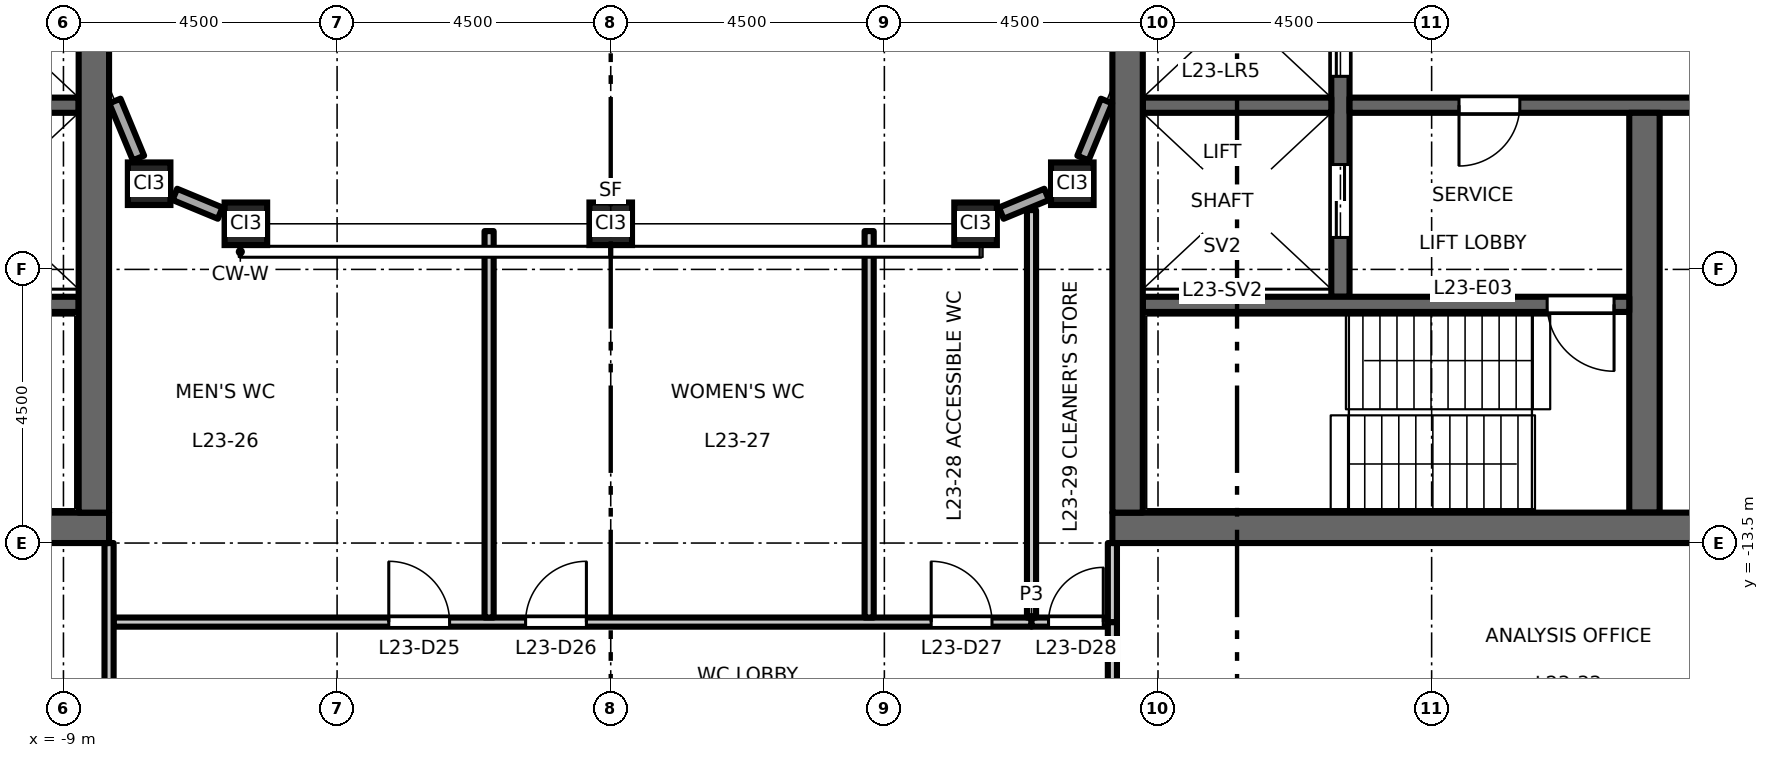
"""IFC4 building model, lengths in metres.
Left out: names, types, materials, properties, quantities, classifications, styles, units other than length and angle.
Written with IfcOpenShell. Run it as: python <this file> out.ifc"""

import sys

from ifc_helpers import new_model, si_unit, direction, frame, frame_2d, origin, origin_2d, place, context, subcontext, project, spatial, rectangle, hollow_rectangle, extrude, element, fill, save


model = new_model("IFC4")
c1 = context("Model", 3, precision=1e-05, world=origin(), true_north=direction((0.0, 1.0)))
c2 = subcontext(c1, "Body", "Model", "MODEL_VIEW")
j1 = project(units=[si_unit("LENGTHUNIT", "METRE"), si_unit("PLANEANGLEUNIT", "RADIAN")], contexts=[c1])
p1 = place(None, origin())
s1 = spatial("IfcSite", under=j1, at=p1, CompositionType="ELEMENT")
p2 = place(p1, origin())
s2 = spatial("IfcBuilding", under=s1, at=p2, CompositionType="ELEMENT")
p3 = place(p2, frame((0.0, 0.0, 109.2)))
s3 = spatial("IfcBuildingStorey", under=s2, at=p3, CompositionType="ELEMENT", Elevation=109.2)
for number, where, z_axis, x_axis in (
    (1, (-7.591, -7.591, 0.0), (0.0, 0.0, 1.0), (1.0, 0.0, 0.0)),
    (2, (-6.0, -8.25, 0.0), (0.0, 0.0, 1.0), (1.0, 0.0, 0.0)),
    (3, (0.0, -8.25, 0.0), (0.0, 0.0, 1.0), (1.0, 0.0, 0.0)),
    (4, (6.0, -8.25, 0.0), (0.0, 0.0, 1.0), (1.0, 0.0, 0.0)),
    (5, (7.591, -7.591, 0.0), (0.0, 0.0, 1.0), (1.0, 0.0, 0.0)),
):
    element("IfcColumn", number, at=place(p3, frame(where, z_axis=z_axis, x_axis=x_axis)), inside=s3, PredefinedType="COLUMN", context=c2, shape_type="SweptSolid", body=[
        extrude(hollow_rectangle(XDim=0.7, YDim=0.7, WallThickness=0.04, at=origin_2d()), origin(), (0.0, 0.0, 1.0), 4.5),
    ])
p4 = place(p3, frame((-8.75, -6.3, 0.0), z_axis=(0.0, 0.0, 1.0), x_axis=(-1.0, 0.0, 0.0)))
e6 = element("IfcWall", 6, at=p4, inside=s3, PredefinedType="SHEAR", context=c2, shape_type="SweptSolid", body=[
    extrude(rectangle(XDim=3.1, YDim=0.25, at=frame_2d((1.55, 0.0))), origin(), (0.0, 0.0, 1.0), 4.35),
])
p5 = place(p3, frame((-8.75, -9.575, 0.0), z_axis=(0.0, 0.0, 1.0), x_axis=(-1.0, 0.0, 0.0)))
e7 = element("IfcWall", 7, at=p5, inside=s3, PredefinedType="SHEAR", context=c2, shape_type="SweptSolid", body=[
    extrude(rectangle(XDim=8.0, YDim=0.25, at=frame_2d((4.0, 0.0))), origin(), (0.0, 0.0, 1.0), 4.35),
])
p6 = place(p5, frame((6.65, 0.0, 0.0)))
e8 = element("IfcOpeningElement", 8, at=p6, cuts=e7, PredefinedType="OPENING", context=c2, shape_type="SweptSolid", body=[
    extrude(rectangle(XDim=1.1, YDim=2.1, at=frame_2d((0.55, 1.05))), frame((0.0, 0.135, 0.0), z_axis=(0.0, -1.0, 0.0), x_axis=(1.0, 0.0, 0.0)), (0.0, 0.0, 1.0), 0.27),
])
p7 = place(p3, frame((-8.25, -13.25, 0.0), z_axis=(0.0, 0.0, 1.0), x_axis=(-1.0, 0.0, 0.0)))
e9 = element("IfcWall", 9, at=p7, inside=s3, PredefinedType="SHEAR", context=c2, shape_type="SweptSolid", body=[
    extrude(rectangle(XDim=13.5, YDim=0.5, at=frame_2d((6.75, 0.0))), origin(), (0.0, 0.0, 1.0), 4.35),
])
p8 = place(p3, frame((-8.5, -13.0, 0.0), z_axis=(0.0, 0.0, 1.0), x_axis=(0.0, 1.0, 0.0)))
e10 = element("IfcWall", 10, at=p8, inside=s3, PredefinedType="SHEAR", context=c2, shape_type="SweptSolid", body=[
    extrude(rectangle(XDim=26.0, YDim=0.5, at=frame_2d((13.0, 0.0))), origin(), (0.0, 0.0, 1.0), 4.35),
])
p9 = place(p3, frame((12.0, -9.45, 0.0), z_axis=(0.0, 0.0, 1.0), x_axis=(0.0, 1.0, 0.0)))
e11 = element("IfcWall", 11, at=p9, inside=s3, PredefinedType="SHEAR", context=c2, shape_type="SweptSolid", body=[
    extrude(rectangle(XDim=18.9, YDim=0.3, at=frame_2d((9.45, 0.0))), origin(), (0.0, 0.0, 1.0), 4.35),
])
p10 = place(p9, frame((3.625, 0.0, 0.0)))
e12 = element("IfcOpeningElement", 12, at=p10, cuts=e11, PredefinedType="OPENING", context=c2, shape_type="SweptSolid", body=[
    extrude(rectangle(XDim=1.1, YDim=2.1, at=frame_2d((0.55, 1.05))), frame((0.0, 0.16, 0.0), z_axis=(0.0, -1.0, 0.0), x_axis=(1.0, 0.0, 0.0)), (0.0, 0.0, 1.0), 0.32),
])
p11 = place(p9, frame((6.775, 0.0, 0.0)))
e13 = element("IfcOpeningElement", 13, at=p11, cuts=e11, PredefinedType="OPENING", context=c2, shape_type="SweptSolid", body=[
    extrude(rectangle(XDim=1.1, YDim=2.1, at=frame_2d((0.55, 1.05))), frame((0.0, 0.16, 0.0), z_axis=(0.0, -1.0, 0.0), x_axis=(1.0, 0.0, 0.0)), (0.0, 0.0, 1.0), 0.32),
])
p12 = place(p9, frame((9.925, 0.0, 0.0)))
e14 = element("IfcOpeningElement", 14, at=p12, cuts=e11, PredefinedType="OPENING", context=c2, shape_type="SweptSolid", body=[
    extrude(rectangle(XDim=1.1, YDim=2.1, at=frame_2d((0.55, 1.05))), frame((0.0, 0.16, 0.0), z_axis=(0.0, -1.0, 0.0), x_axis=(1.0, 0.0, 0.0)), (0.0, 0.0, 1.0), 0.32),
])
p13 = place(p9, frame((13.075, 0.0, 0.0)))
e15 = element("IfcOpeningElement", 15, at=p13, cuts=e11, PredefinedType="OPENING", context=c2, shape_type="SweptSolid", body=[
    extrude(rectangle(XDim=1.1, YDim=2.1, at=frame_2d((0.55, 1.05))), frame((0.0, 0.16, 0.0), z_axis=(0.0, -1.0, 0.0), x_axis=(1.0, 0.0, 0.0)), (0.0, 0.0, 1.0), 0.32),
])
p14 = place(p9, frame((16.725, 0.0, 0.0)))
e16 = element("IfcOpeningElement", 16, at=p14, cuts=e11, PredefinedType="OPENING", context=c2, shape_type="SweptSolid", body=[
    extrude(rectangle(XDim=1.2, YDim=2.1, at=frame_2d((0.6, 1.05))), frame((0.0, 0.16, 0.0), z_axis=(0.0, -1.0, 0.0), x_axis=(1.0, 0.0, 0.0)), (0.0, 0.0, 1.0), 0.32),
])
p15 = place(p9, frame((0.975, 0.0, 0.0)))
e17 = element("IfcOpeningElement", 17, at=p15, cuts=e11, PredefinedType="OPENING", context=c2, shape_type="SweptSolid", body=[
    extrude(rectangle(XDim=1.2, YDim=2.1, at=frame_2d((0.6, 1.05))), frame((0.0, 0.16, 0.0), z_axis=(0.0, -1.0, 0.0), x_axis=(1.0, 0.0, 0.0)), (0.0, 0.0, 1.0), 0.32),
])
p16 = place(p3, frame((12.15, -6.3, 0.0), z_axis=(0.0, 0.0, 1.0), x_axis=(1.0, 0.0, 0.0)))
e18 = element("IfcWall", 18, at=p16, inside=s3, PredefinedType="SHEAR", context=c2, shape_type="SweptSolid", body=[
    extrude(rectangle(XDim=9.1, YDim=0.25, at=frame_2d((4.55, 0.0))), origin(), (0.0, 0.0, 1.0), 4.35),
])
p17 = place(p16, frame((1.8, 0.0, 0.0)))
e19 = element("IfcOpeningElement", 19, at=p17, cuts=e18, PredefinedType="OPENING", context=c2, shape_type="SweptSolid", body=[
    extrude(rectangle(XDim=1.0, YDim=2.1, at=frame_2d((0.5, 1.05))), frame((0.0, 0.135, 0.0), z_axis=(0.0, -1.0, 0.0), x_axis=(1.0, 0.0, 0.0)), (0.0, 0.0, 1.0), 0.27),
])
p18 = place(p16, frame((6.65, 0.0, 0.0)))
e20 = element("IfcOpeningElement", 20, at=p18, cuts=e18, PredefinedType="OPENING", context=c2, shape_type="SweptSolid", body=[
    extrude(rectangle(XDim=0.9, YDim=2.1, at=frame_2d((0.45, 1.05))), frame((0.0, 0.135, 0.0), z_axis=(0.0, -1.0, 0.0), x_axis=(1.0, 0.0, 0.0)), (0.0, 0.0, 1.0), 0.27),
])
p19 = place(p3, frame((17.0, -13.0, 0.0), z_axis=(0.0, 0.0, 1.0), x_axis=(0.0, 1.0, 0.0)))
e21 = element("IfcWall", 21, at=p19, inside=s3, PredefinedType="SHEAR", context=c2, shape_type="SweptSolid", body=[
    extrude(rectangle(XDim=6.575, YDim=0.5, at=frame_2d((3.288, 0.0))), origin(), (0.0, 0.0, 1.0), 4.35),
])
p20 = place(p3, frame((8.75, -6.3, 0.0), z_axis=(0.0, 0.0, 1.0), x_axis=(1.0, 0.0, 0.0)))
e22 = element("IfcWall", 22, at=p20, inside=s3, PredefinedType="SHEAR", context=c2, shape_type="SweptSolid", body=[
    extrude(rectangle(XDim=3.1, YDim=0.25, at=frame_2d((1.55, 0.0))), origin(), (0.0, 0.0, 1.0), 4.35),
])
p21 = place(p3, frame((8.75, -9.575, 0.0), z_axis=(0.0, 0.0, 1.0), x_axis=(1.0, 0.0, 0.0)))
e23 = element("IfcWall", 23, at=p21, inside=s3, PredefinedType="SHEAR", context=c2, shape_type="SweptSolid", body=[
    extrude(rectangle(XDim=8.0, YDim=0.25, at=frame_2d((4.0, 0.0))), origin(), (0.0, 0.0, 1.0), 4.35),
])
p22 = place(p21, frame((6.65, 0.0, 0.0)))
e24 = element("IfcOpeningElement", 24, at=p22, cuts=e23, PredefinedType="OPENING", context=c2, shape_type="SweptSolid", body=[
    extrude(rectangle(XDim=1.1, YDim=2.1, at=frame_2d((0.55, 1.05))), frame((0.0, 0.135, 0.0), z_axis=(0.0, -1.0, 0.0), x_axis=(1.0, 0.0, 0.0)), (0.0, 0.0, 1.0), 0.27),
])
p23 = place(p3, frame((8.25, -13.25, 0.0), z_axis=(0.0, 0.0, 1.0), x_axis=(1.0, 0.0, 0.0)))
e25 = element("IfcWall", 25, at=p23, inside=s3, PredefinedType="SHEAR", context=c2, shape_type="SweptSolid", body=[
    extrude(rectangle(XDim=13.5, YDim=0.5, at=frame_2d((6.75, 0.0))), origin(), (0.0, 0.0, 1.0), 4.35),
])
p24 = place(p3, frame((8.5, -13.0, 0.0), z_axis=(0.0, 0.0, 1.0), x_axis=(0.0, 1.0, 0.0)))
e26 = element("IfcWall", 26, at=p24, inside=s3, PredefinedType="SHEAR", context=c2, shape_type="SweptSolid", body=[
    extrude(rectangle(XDim=26.0, YDim=0.5, at=frame_2d((13.0, 0.0))), origin(), (0.0, 0.0, 1.0), 4.35),
])
p25 = place(p3, frame((6.423, -8.075, 0.0), z_axis=(0.0, 0.0, 1.0), x_axis=(0.923817771127, 0.382832503518, 0.0)))
e27 = element("IfcWall", 27, at=p25, inside=s3, PredefinedType="STANDARD", context=c2, shape_type="SweptSolid", body=[
    extrude(rectangle(XDim=0.807, YDim=0.2, at=frame_2d((0.404, 0.0))), origin(), (0.0, 0.0, 1.0), 3.826),
])
for number, where, z_axis, x_axis in (
    (28, (7.766, -7.168, 0.0), (0.0, 0.0, 1.0), (0.383, 0.924, 0.0)),
    (29, (-8.154, -6.231, 0.0), (0.0, 0.0, 1.0), (0.383, -0.924, 0.0)),
):
    element("IfcWall", number, at=place(p3, frame(where, z_axis=z_axis, x_axis=x_axis)), inside=s3, PredefinedType="STANDARD", context=c2, shape_type="SweptSolid", body=[
        extrude(rectangle(XDim=1.015, YDim=0.2, at=frame_2d((0.507, 0.0))), origin(), (0.0, 0.0, 1.0), 3.826),
    ])
p26 = place(p3, frame((-7.168, -7.766, 0.0), z_axis=(0.0, 0.0, 1.0), x_axis=(0.923817771127, -0.382832503518, 0.0)))
e30 = element("IfcWall", 30, at=p26, inside=s3, PredefinedType="STANDARD", context=c2, shape_type="SweptSolid", body=[
    extrude(rectangle(XDim=0.807, YDim=0.2, at=frame_2d((0.404, 0.0))), origin(), (0.0, 0.0, 1.0), 3.826),
])
p27 = place(p3, frame((-8.175, -14.8, 0.0), z_axis=(0.0, 0.0, 1.0), x_axis=(1.0, 0.0, 0.0)))
e31 = element("IfcWall", 31, at=p27, inside=s3, PredefinedType="PARTITIONING", context=c2, shape_type="SweptSolid", body=[
    extrude(rectangle(XDim=15.095, YDim=0.15, at=frame_2d((7.547, 0.0))), origin(), (0.0, 0.0, 1.0), 4.35),
])
p28 = place(p27, frame((4.525, 0.0, 0.0)))
e32 = element("IfcOpeningElement", 32, at=p28, cuts=e31, PredefinedType="OPENING", context=c2, shape_type="SweptSolid", body=[
    extrude(rectangle(XDim=1.0, YDim=2.1, at=frame_2d((0.5, 1.05))), frame((0.0, 0.085, 0.0), z_axis=(0.0, -1.0, 0.0), x_axis=(1.0, 0.0, 0.0)), (0.0, 0.0, 1.0), 0.17),
])
p29 = place(p27, frame((6.775, 0.0, 0.0)))
e33 = element("IfcOpeningElement", 33, at=p29, cuts=e31, PredefinedType="OPENING", context=c2, shape_type="SweptSolid", body=[
    extrude(rectangle(XDim=1.0, YDim=2.1, at=frame_2d((0.5, 1.05))), frame((0.0, 0.085, 0.0), z_axis=(0.0, -1.0, 0.0), x_axis=(1.0, 0.0, 0.0)), (0.0, 0.0, 1.0), 0.17),
])
p30 = place(p27, frame((13.445, 0.0, 0.0)))
e34 = element("IfcOpeningElement", 34, at=p30, cuts=e31, PredefinedType="OPENING", context=c2, shape_type="SweptSolid", body=[
    extrude(rectangle(XDim=1.0, YDim=2.1, at=frame_2d((0.5, 1.05))), frame((0.0, 0.085, 0.0), z_axis=(0.0, -1.0, 0.0), x_axis=(1.0, 0.0, 0.0)), (0.0, 0.0, 1.0), 0.17),
])
p31 = place(p3, frame((6.92, -14.8, 0.0), z_axis=(0.0, 0.0, 1.0), x_axis=(1.0, 0.0, 0.0)))
e35 = element("IfcWall", 35, at=p31, inside=s3, PredefinedType="PARTITIONING", context=c2, shape_type="SweptSolid", body=[
    extrude(rectangle(XDim=1.255, YDim=0.15, at=frame_2d((0.627, 0.0))), origin(), (0.0, 0.0, 1.0), 4.35),
])
p32 = place(p31, frame((0.28, 0.0, 0.0)))
e36 = element("IfcOpeningElement", 36, at=p32, cuts=e35, PredefinedType="OPENING", context=c2, shape_type="SweptSolid", body=[
    extrude(rectangle(XDim=0.9, YDim=2.1, at=frame_2d((0.45, 1.05))), frame((0.0, 0.085, 0.0), z_axis=(0.0, -1.0, 0.0), x_axis=(1.0, 0.0, 0.0)), (0.0, 0.0, 1.0), 0.17),
])
p33 = place(p3, frame((-8.25, -16.925, 0.0), z_axis=(0.0, 0.0, 1.0), x_axis=(0.0, 1.0, 0.0)))
e37 = element("IfcWall", 37, at=p33, inside=s3, PredefinedType="PARTITIONING", context=c2, shape_type="SweptSolid", body=[
    extrude(rectangle(XDim=3.425, YDim=0.15, at=frame_2d((1.712, 0.0))), origin(), (0.0, 0.0, 1.0), 4.35),
])
for number, where, z_axis, x_axis in (
    (38, (-2.0, -14.725, 0.0), (0.0, 0.0, 1.0), (0.0, 1.0, 0.0)),
    (39, (4.25, -14.725, 0.0), (0.0, 0.0, 1.0), (0.0, 1.0, 0.0)),
):
    element("IfcWall", number, at=place(p3, frame(where, z_axis=z_axis, x_axis=x_axis)), inside=s3, PredefinedType="PARTITIONING", context=c2, shape_type="SweptSolid", body=[
        extrude(rectangle(XDim=6.355, YDim=0.15, at=frame_2d((3.177, 0.0))), origin(), (0.0, 0.0, 1.0), 4.35),
    ])
p34 = place(p3, frame((6.92, -14.725, 0.0), z_axis=(0.0, 0.0, 1.0), x_axis=(0.0, 1.0, 0.0)))
e40 = element("IfcWall", 40, at=p34, inside=s3, PredefinedType="PARTITIONING", context=c2, shape_type="SweptSolid", body=[
    extrude(rectangle(XDim=6.7, YDim=0.15, at=frame_2d((3.35, 0.0))), origin(), (0.0, 0.0, 1.0), 4.35),
])
p35 = place(p3, frame((8.25, -16.925, 0.0), z_axis=(0.0, 0.0, 1.0), x_axis=(0.0, 1.0, 0.0)))
e41 = element("IfcWall", 41, at=p35, inside=s3, PredefinedType="PARTITIONING", context=c2, shape_type="SweptSolid", body=[
    extrude(rectangle(XDim=2.125, YDim=0.15, at=frame_2d((1.062, 0.0))), origin(), (0.0, 0.0, 1.0), 4.35),
])
p36 = place(p3, frame((8.25, -14.8, 0.0), z_axis=(0.0, 0.0, 1.0), x_axis=(0.0, 1.0, 0.0)))
e42 = element("IfcWall", 42, at=p36, inside=s3, PredefinedType="PARTITIONING", context=c2, shape_type="SweptSolid", body=[
    extrude(rectangle(XDim=1.3, YDim=0.15, at=frame_2d((0.65, 0.0))), origin(), (0.0, 0.0, 1.0), 4.35),
])
p37 = place(p17, origin())
e43 = element("IfcDoor", 43, at=p37, inside=s3, OperationType="SINGLE_SWING_LEFT", PredefinedType="DOOR", context=c2, shape_type="SweptSolid", body=[
    extrude(rectangle(XDim=1.0, YDim=2.1, at=frame_2d((0.5, 1.05))), frame((0.0, 0.025, 0.0), z_axis=(0.0, -1.0, 0.0), x_axis=(1.0, 0.0, 0.0)), (0.0, 0.0, 1.0), 0.05),
])
fill(e19, e43)
p38 = place(p22, origin())
e44 = element("IfcDoor", 44, at=p38, inside=s3, OperationType="SINGLE_SWING_RIGHT", PredefinedType="DOOR", context=c2, shape_type="SweptSolid", body=[
    extrude(rectangle(XDim=1.1, YDim=2.1, at=frame_2d((0.55, 1.05))), frame((0.0, 0.025, 0.0), z_axis=(0.0, -1.0, 0.0), x_axis=(1.0, 0.0, 0.0)), (0.0, 0.0, 1.0), 0.05),
])
fill(e24, e44)
p39 = place(p10, origin())
e45 = element("IfcDoor", 45, at=p39, inside=s3, OperationType="DOUBLE_DOOR_SLIDING", PredefinedType="DOOR", context=c2, shape_type="SweptSolid", body=[
    extrude(rectangle(XDim=1.1, YDim=2.1, at=frame_2d((0.55, 1.05))), frame((0.0, 0.025, 0.0), z_axis=(0.0, -1.0, 0.0), x_axis=(1.0, 0.0, 0.0)), (0.0, 0.0, 1.0), 0.05),
])
fill(e12, e45)
p40 = place(p15, origin())
e46 = element("IfcDoor", 46, at=p40, inside=s3, OperationType="DOUBLE_DOOR_SLIDING", PredefinedType="DOOR", context=c2, shape_type="SweptSolid", body=[
    extrude(rectangle(XDim=1.2, YDim=2.1, at=frame_2d((0.6, 1.05))), frame((0.0, 0.025, 0.0), z_axis=(0.0, -1.0, 0.0), x_axis=(1.0, 0.0, 0.0)), (0.0, 0.0, 1.0), 0.05),
])
fill(e17, e46)
p41 = place(p28, origin())
e47 = element("IfcDoor", 47, at=p41, inside=s3, OperationType="SINGLE_SWING_LEFT", PredefinedType="DOOR", context=c2, shape_type="SweptSolid", body=[
    extrude(rectangle(XDim=1.0, YDim=2.1, at=frame_2d((0.5, 1.05))), frame((0.0, 0.025, 0.0), z_axis=(0.0, -1.0, 0.0), x_axis=(1.0, 0.0, 0.0)), (0.0, 0.0, 1.0), 0.05),
])
fill(e32, e47)
p42 = place(p29, origin())
e48 = element("IfcDoor", 48, at=p42, inside=s3, OperationType="SINGLE_SWING_RIGHT", PredefinedType="DOOR", context=c2, shape_type="SweptSolid", body=[
    extrude(rectangle(XDim=1.0, YDim=2.1, at=frame_2d((0.5, 1.05))), frame((0.0, 0.025, 0.0), z_axis=(0.0, -1.0, 0.0), x_axis=(1.0, 0.0, 0.0)), (0.0, 0.0, 1.0), 0.05),
])
fill(e33, e48)
p43 = place(p30, origin())
e49 = element("IfcDoor", 49, at=p43, inside=s3, OperationType="SINGLE_SWING_LEFT", PredefinedType="DOOR", context=c2, shape_type="SweptSolid", body=[
    extrude(rectangle(XDim=1.0, YDim=2.1, at=frame_2d((0.5, 1.05))), frame((0.0, 0.025, 0.0), z_axis=(0.0, -1.0, 0.0), x_axis=(1.0, 0.0, 0.0)), (0.0, 0.0, 1.0), 0.05),
])
fill(e34, e49)
p44 = place(p32, origin())
e50 = element("IfcDoor", 50, at=p44, inside=s3, OperationType="SINGLE_SWING_RIGHT", PredefinedType="DOOR", context=c2, shape_type="SweptSolid", body=[
    extrude(rectangle(XDim=0.9, YDim=2.1, at=frame_2d((0.45, 1.05))), frame((0.0, 0.025, 0.0), z_axis=(0.0, -1.0, 0.0), x_axis=(1.0, 0.0, 0.0)), (0.0, 0.0, 1.0), 0.05),
])
fill(e36, e50)
save(model, sys.argv[1])
